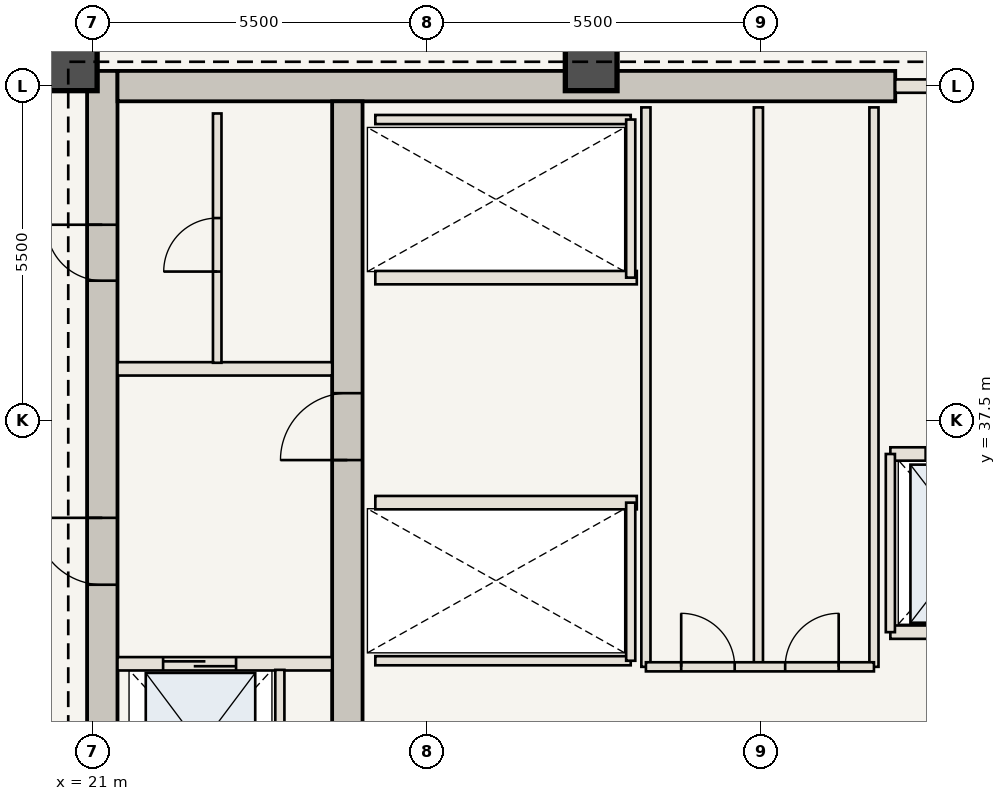
"""IFC4 building model, lengths in metres.
Left out: names, types, materials, properties, quantities, classifications, styles, units other than length and angle.
Written with IfcOpenShell. Run it as: python <this file> out.ifc"""

import sys

from ifc_helpers import new_model, si_unit, direction, frame, frame_2d, origin, origin_2d, place, context, subcontext, project, spatial, rectangle, extrude, element, fill, save


model = new_model("IFC4")
c1 = context("Model", 3, precision=1e-05, world=origin(), true_north=direction((0.0, 1.0)))
c2 = subcontext(c1, "Body", "Model", "MODEL_VIEW")
j1 = project(units=[si_unit("LENGTHUNIT", "METRE"), si_unit("PLANEANGLEUNIT", "RADIAN")], contexts=[c1])
p1 = place(None, origin())
s1 = spatial("IfcSite", under=j1, at=p1, CompositionType="ELEMENT")
p2 = place(p1, origin())
s2 = spatial("IfcBuilding", under=s1, at=p2, CompositionType="ELEMENT")
p3 = place(p2, frame((0.0, 0.0, 248.5)))
s3 = spatial("IfcBuildingStorey", under=s2, at=p3, CompositionType="ELEMENT", Elevation=248.5)
p4 = place(p3, frame((21.16, 30.6, 0.0), z_axis=(0.0, 0.0, 1.0), x_axis=(0.0, 1.0, 0.0)))
e1 = element("IfcWall", 1, at=p4, inside=s3, PredefinedType="SHEAR", context=c2, shape_type="SweptSolid", body=[
    extrude(rectangle(XDim=12.65, YDim=0.5, at=frame_2d((6.325, 0.0))), origin(), (0.0, 0.0, 1.0), 3.85),
])
p5 = place(p4, frame((4.2, 0.0, 0.0)))
e2 = element("IfcOpeningElement", 2, at=p5, cuts=e1, PredefinedType="OPENING", context=c2, shape_type="SweptSolid", body=[
    extrude(rectangle(XDim=1.1, YDim=2.15, at=frame_2d((0.55, 1.075))), frame((0.0, 0.26, 0.0), z_axis=(0.0, -1.0, 0.0), x_axis=(1.0, 0.0, 0.0)), (0.0, 0.0, 1.0), 0.52),
])
p6 = place(p4, frame((9.2, 0.0, 0.0)))
e3 = element("IfcOpeningElement", 3, at=p6, cuts=e1, PredefinedType="OPENING", context=c2, shape_type="SweptSolid", body=[
    extrude(rectangle(XDim=0.92, YDim=2.1, at=frame_2d((0.46, 1.05))), frame((0.0, 0.26, 0.0), z_axis=(0.0, -1.0, 0.0), x_axis=(1.0, 0.0, 0.0)), (0.0, 0.0, 1.0), 0.52),
])
p7 = place(p3, frame((21.41, 43.0, 0.0), z_axis=(0.0, 0.0, 1.0), x_axis=(1.0, 0.0, 0.0)))
e4 = element("IfcWall", 4, at=p7, inside=s3, PredefinedType="SHEAR", context=c2, shape_type="SweptSolid", body=[
    extrude(rectangle(XDim=12.79, YDim=0.5, at=frame_2d((6.395, 0.0))), origin(), (0.0, 0.0, 1.0), 3.85),
])
p8 = place(p3, frame((25.19, 30.6, 0.0), z_axis=(0.0, 0.0, 1.0), x_axis=(0.0, 1.0, 0.0)))
e5 = element("IfcWall", 5, at=p8, inside=s3, PredefinedType="SHEAR", context=c2, shape_type="SweptSolid", body=[
    extrude(rectangle(XDim=12.15, YDim=0.5, at=frame_2d((6.075, 0.0))), origin(), (0.0, 0.0, 1.0), 3.85),
])
p9 = place(p8, frame((6.25, 0.0, 0.0)))
e6 = element("IfcOpeningElement", 6, at=p9, cuts=e5, PredefinedType="OPENING", context=c2, shape_type="SweptSolid", body=[
    extrude(rectangle(XDim=1.1, YDim=2.15, at=frame_2d((0.55, 1.075))), frame((0.0, 0.26, 0.0), z_axis=(0.0, -1.0, 0.0), x_axis=(1.0, 0.0, 0.0)), (0.0, 0.0, 1.0), 0.52),
])
for number, where, z_axis, x_axis in (
    (7, (29.2, 43.35, 0.0), (0.0, 0.0, 1.0), (1.0, 0.0, 0.0)),
    (8, (20.65, 43.35, 0.0), (0.0, 0.0, 1.0), (1.0, 0.0, 0.0)),
):
    element("IfcColumn", number, at=place(p3, frame(where, z_axis=z_axis, x_axis=x_axis)), inside=s3, PredefinedType="COLUMN", context=c2, shape_type="SweptSolid", body=[
        extrude(rectangle(XDim=0.85, YDim=0.85, at=origin_2d()), origin(), (0.0, 0.0, 1.0), 3.85),
    ])
p10 = place(p3, frame((21.41, 33.5, 0.0), z_axis=(0.0, 0.0, 1.0), x_axis=(1.0, 0.0, 0.0)))
e9 = element("IfcWall", 9, at=p10, inside=s3, PredefinedType="STANDARD", context=c2, shape_type="SweptSolid", body=[
    extrude(rectangle(XDim=3.53, YDim=0.22, at=frame_2d((1.765, 0.0))), origin(), (0.0, 0.0, 1.0), 3.43),
])
p11 = place(p10, frame((0.75, 0.0, 0.0)))
e10 = element("IfcOpeningElement", 10, at=p11, cuts=e9, PredefinedType="OPENING", context=c2, shape_type="SweptSolid", body=[
    extrude(rectangle(XDim=1.2, YDim=2.2, at=frame_2d((0.6, 1.1))), frame((0.0, 0.12, 0.0), z_axis=(0.0, -1.0, 0.0), x_axis=(1.0, 0.0, 0.0)), (0.0, 0.0, 1.0), 0.24),
])
p12 = place(p3, frame((24.08, 30.75, 0.0), z_axis=(0.0, 0.0, 1.0), x_axis=(0.0, 1.0, 0.0)))
e11 = element("IfcWall", 11, at=p12, inside=s3, PredefinedType="STANDARD", context=c2, shape_type="SweptSolid", body=[
    extrude(rectangle(XDim=2.65, YDim=0.15, at=frame_2d((1.325, 0.0))), origin(), (0.0, 0.0, 1.0), 3.43),
])
p13 = place(p3, frame((21.41, 38.35, 0.0), z_axis=(0.0, 0.0, 1.0), x_axis=(1.0, 0.0, 0.0)))
e12 = element("IfcWall", 12, at=p13, inside=s3, PredefinedType="STANDARD", context=c2, shape_type="SweptSolid", body=[
    extrude(rectangle(XDim=3.53, YDim=0.22, at=frame_2d((1.765, 0.0))), origin(), (0.0, 0.0, 1.0), 3.43),
])
p14 = place(p3, frame((23.05, 38.45, 0.0), z_axis=(0.0, 0.0, 1.0), x_axis=(0.0, 1.0, 0.0)))
e13 = element("IfcWall", 13, at=p14, inside=s3, PredefinedType="STANDARD", context=c2, shape_type="SweptSolid", body=[
    extrude(rectangle(XDim=4.1, YDim=0.14, at=frame_2d((2.05, 0.0))), origin(), (0.0, 0.0, 1.0), 3.43),
])
p15 = place(p14, frame((1.5, 0.0, 0.0)))
e14 = element("IfcOpeningElement", 14, at=p15, cuts=e13, PredefinedType="OPENING", context=c2, shape_type="SweptSolid", body=[
    extrude(rectangle(XDim=0.88, YDim=2.1, at=frame_2d((0.44, 1.05))), frame((0.0, 0.08, 0.0), z_axis=(0.0, -1.0, 0.0), x_axis=(1.0, 0.0, 0.0)), (0.0, 0.0, 1.0), 0.16),
])
p16 = place(p3, frame((25.65, 36.15, 0.0), z_axis=(0.0, 0.0, 1.0), x_axis=(1.0, 0.0, 0.0)))
e15 = element("IfcWall", 15, at=p16, inside=s3, PredefinedType="STANDARD", context=c2, shape_type="SweptSolid", body=[
    extrude(rectangle(XDim=4.3, YDim=0.22, at=frame_2d((2.15, 0.0))), origin(), (0.0, 0.0, 1.0), 3.43),
])
p17 = place(p3, frame((25.65, 33.55, 0.0), z_axis=(0.0, 0.0, 1.0), x_axis=(1.0, 0.0, 0.0)))
e16 = element("IfcWall", 16, at=p17, inside=s3, PredefinedType="STANDARD", context=c2, shape_type="SweptSolid", body=[
    extrude(rectangle(XDim=4.2, YDim=0.15, at=frame_2d((2.1, 0.0))), origin(), (0.0, 0.0, 1.0), 3.43),
])
p18 = place(p3, frame((29.85, 33.55, 0.0), z_axis=(0.0, 0.0, 1.0), x_axis=(0.0, 1.0, 0.0)))
e17 = element("IfcWall", 17, at=p18, inside=s3, PredefinedType="STANDARD", context=c2, shape_type="SweptSolid", body=[
    extrude(rectangle(XDim=2.6, YDim=0.15, at=frame_2d((1.3, 0.0))), origin(), (0.0, 0.0, 1.0), 3.43),
])
p19 = place(p3, frame((25.65, 39.85, 0.0), z_axis=(0.0, 0.0, 1.0), x_axis=(1.0, 0.0, 0.0)))
e18 = element("IfcWall", 18, at=p19, inside=s3, PredefinedType="STANDARD", context=c2, shape_type="SweptSolid", body=[
    extrude(rectangle(XDim=4.3, YDim=0.22, at=frame_2d((2.15, 0.0))), origin(), (0.0, 0.0, 1.0), 3.43),
])
p20 = place(p3, frame((25.65, 42.45, 0.0), z_axis=(0.0, 0.0, 1.0), x_axis=(1.0, 0.0, 0.0)))
e19 = element("IfcWall", 19, at=p20, inside=s3, PredefinedType="STANDARD", context=c2, shape_type="SweptSolid", body=[
    extrude(rectangle(XDim=4.2, YDim=0.15, at=frame_2d((2.1, 0.0))), origin(), (0.0, 0.0, 1.0), 3.43),
])
p21 = place(p3, frame((29.85, 39.85, 0.0), z_axis=(0.0, 0.0, 1.0), x_axis=(0.0, 1.0, 0.0)))
e20 = element("IfcWall", 20, at=p21, inside=s3, PredefinedType="STANDARD", context=c2, shape_type="SweptSolid", body=[
    extrude(rectangle(XDim=2.6, YDim=0.15, at=frame_2d((1.3, 0.0))), origin(), (0.0, 0.0, 1.0), 3.43),
])
for number, where, z_axis, x_axis in (
    (21, (30.1, 33.45, 0.0), (0.0, 0.0, 1.0), (0.0, 1.0, 0.0)),
    (22, (31.95, 33.45, 0.0), (0.0, 0.0, 1.0), (0.0, 1.0, 0.0)),
    (23, (33.85, 33.45, 0.0), (0.0, 0.0, 1.0), (0.0, 1.0, 0.0)),
):
    element("IfcWall", number, at=place(p3, frame(where, z_axis=z_axis, x_axis=x_axis)), inside=s3, PredefinedType="STANDARD", context=c2, shape_type="SweptSolid", body=[
        extrude(rectangle(XDim=9.2, YDim=0.15, at=frame_2d((4.6, 0.0))), origin(), (0.0, 0.0, 1.0), 3.43),
    ])
p22 = place(p3, frame((30.1, 33.45, 0.0), z_axis=(0.0, 0.0, 1.0), x_axis=(1.0, 0.0, 0.0)))
e24 = element("IfcWall", 24, at=p22, inside=s3, PredefinedType="STANDARD", context=c2, shape_type="SweptSolid", body=[
    extrude(rectangle(XDim=3.75, YDim=0.15, at=frame_2d((1.875, 0.0))), origin(), (0.0, 0.0, 1.0), 3.43),
])
p23 = place(p22, frame((0.58, 0.0, 0.0)))
e25 = element("IfcOpeningElement", 25, at=p23, cuts=e24, PredefinedType="OPENING", context=c2, shape_type="SweptSolid", body=[
    extrude(rectangle(XDim=0.88, YDim=2.1, at=frame_2d((0.44, 1.05))), frame((0.0, 0.085, 0.0), z_axis=(0.0, -1.0, 0.0), x_axis=(1.0, 0.0, 0.0)), (0.0, 0.0, 1.0), 0.17),
])
p24 = place(p22, frame((2.29, 0.0, 0.0)))
e26 = element("IfcOpeningElement", 26, at=p24, cuts=e24, PredefinedType="OPENING", context=c2, shape_type="SweptSolid", body=[
    extrude(rectangle(XDim=0.88, YDim=2.1, at=frame_2d((0.44, 1.05))), frame((0.0, 0.085, 0.0), z_axis=(0.0, -1.0, 0.0), x_axis=(1.0, 0.0, 0.0)), (0.0, 0.0, 1.0), 0.17),
])
p25 = place(p3, frame((34.2, 43.0, 0.0), z_axis=(0.0, 0.0, 1.0), x_axis=(1.0, 0.0, 0.0)))
e27 = element("IfcWall", 27, at=p25, inside=s3, PredefinedType="STANDARD", context=c2, shape_type="SweptSolid", body=[
    extrude(rectangle(XDim=3.55, YDim=0.22, at=frame_2d((1.775, 0.0))), origin(), (0.0, 0.0, 1.0), 3.43),
])
p26 = place(p25, frame((1.4, 0.0, 0.0)))
e28 = element("IfcOpeningElement", 28, at=p26, cuts=e27, PredefinedType="OPENING", context=c2, shape_type="SweptSolid", body=[
    extrude(rectangle(XDim=1.1, YDim=2.15, at=frame_2d((0.55, 1.075))), frame((0.0, 0.12, 0.0), z_axis=(0.0, -1.0, 0.0), x_axis=(1.0, 0.0, 0.0)), (0.0, 0.0, 1.0), 0.24),
])
p27 = place(p3, frame((34.12, 36.95, 0.0), z_axis=(0.0, 0.0, 1.0), x_axis=(1.0, 0.0, 0.0)))
e29 = element("IfcWall", 29, at=p27, inside=s3, PredefinedType="STANDARD", context=c2, shape_type="SweptSolid", body=[
    extrude(rectangle(XDim=2.68, YDim=0.22, at=frame_2d((1.34, 0.0))), origin(), (0.0, 0.0, 1.0), 3.43),
])
p28 = place(p27, frame((0.58, 0.0, 0.0)))
e30 = element("IfcOpeningElement", 30, at=p28, cuts=e29, PredefinedType="OPENING", context=c2, shape_type="SweptSolid", body=[
    extrude(rectangle(XDim=1.2, YDim=2.2, at=frame_2d((0.6, 1.1))), frame((0.0, 0.12, 0.0), z_axis=(0.0, -1.0, 0.0), x_axis=(1.0, 0.0, 0.0)), (0.0, 0.0, 1.0), 0.24),
])
p29 = place(p3, frame((34.12, 34.02, 0.0), z_axis=(0.0, 0.0, 1.0), x_axis=(1.0, 0.0, 0.0)))
e31 = element("IfcWall", 31, at=p29, inside=s3, PredefinedType="STANDARD", context=c2, shape_type="SweptSolid", body=[
    extrude(rectangle(XDim=2.68, YDim=0.22, at=frame_2d((1.34, 0.0))), origin(), (0.0, 0.0, 1.0), 3.43),
])
p30 = place(p3, frame((34.12, 34.02, 0.0), z_axis=(0.0, 0.0, 1.0), x_axis=(0.0, 1.0, 0.0)))
e32 = element("IfcWall", 32, at=p30, inside=s3, PredefinedType="STANDARD", context=c2, shape_type="SweptSolid", body=[
    extrude(rectangle(XDim=2.93, YDim=0.15, at=frame_2d((1.465, 0.0))), origin(), (0.0, 0.0, 1.0), 3.43),
])
p31 = place(p5, origin())
e33 = element("IfcDoor", 33, at=p31, inside=s3, OperationType="SINGLE_SWING_RIGHT", PredefinedType="DOOR", context=c2, shape_type="SweptSolid", body=[
    extrude(rectangle(XDim=1.1, YDim=2.15, at=frame_2d((0.55, 1.075))), frame((0.0, 0.025, 0.0), z_axis=(0.0, -1.0, 0.0), x_axis=(1.0, 0.0, 0.0)), (0.0, 0.0, 1.0), 0.05),
])
fill(e2, e33)
p32 = place(p9, origin())
e34 = element("IfcDoor", 34, at=p32, inside=s3, OperationType="SINGLE_SWING_LEFT", PredefinedType="DOOR", context=c2, shape_type="SweptSolid", body=[
    extrude(rectangle(XDim=1.1, YDim=2.15, at=frame_2d((0.55, 1.075))), frame((0.0, 0.025, 0.0), z_axis=(0.0, -1.0, 0.0), x_axis=(1.0, 0.0, 0.0)), (0.0, 0.0, 1.0), 0.05),
])
fill(e6, e34)
p33 = place(p6, origin())
e35 = element("IfcDoor", 35, at=p33, inside=s3, OperationType="SINGLE_SWING_RIGHT", PredefinedType="DOOR", context=c2, shape_type="SweptSolid", body=[
    extrude(rectangle(XDim=0.92, YDim=2.1, at=frame_2d((0.46, 1.05))), frame((0.0, 0.025, 0.0), z_axis=(0.0, -1.0, 0.0), x_axis=(1.0, 0.0, 0.0)), (0.0, 0.0, 1.0), 0.05),
])
fill(e3, e35)
p34 = place(p11, origin())
e36 = element("IfcDoor", 36, at=p34, inside=s3, OperationType="DOUBLE_DOOR_SLIDING", PredefinedType="DOOR", context=c2, shape_type="SweptSolid", body=[
    extrude(rectangle(XDim=1.2, YDim=2.2, at=frame_2d((0.6, 1.1))), frame((0.0, 0.025, 0.0), z_axis=(0.0, -1.0, 0.0), x_axis=(1.0, 0.0, 0.0)), (0.0, 0.0, 1.0), 0.05),
])
fill(e10, e36)
p35 = place(p15, origin())
e37 = element("IfcDoor", 37, at=p35, inside=s3, OperationType="SINGLE_SWING_LEFT", PredefinedType="DOOR", context=c2, shape_type="SweptSolid", body=[
    extrude(rectangle(XDim=0.88, YDim=2.1, at=frame_2d((0.44, 1.05))), frame((0.0, 0.025, 0.0), z_axis=(0.0, -1.0, 0.0), x_axis=(1.0, 0.0, 0.0)), (0.0, 0.0, 1.0), 0.05),
])
fill(e14, e37)
p36 = place(p23, origin())
e38 = element("IfcDoor", 38, at=p36, inside=s3, OperationType="SINGLE_SWING_LEFT", PredefinedType="DOOR", context=c2, shape_type="SweptSolid", body=[
    extrude(rectangle(XDim=0.88, YDim=2.1, at=frame_2d((0.44, 1.05))), frame((0.0, 0.025, 0.0), z_axis=(0.0, -1.0, 0.0), x_axis=(1.0, 0.0, 0.0)), (0.0, 0.0, 1.0), 0.05),
])
fill(e25, e38)
p37 = place(p24, origin())
e39 = element("IfcDoor", 39, at=p37, inside=s3, OperationType="SINGLE_SWING_RIGHT", PredefinedType="DOOR", context=c2, shape_type="SweptSolid", body=[
    extrude(rectangle(XDim=0.88, YDim=2.1, at=frame_2d((0.44, 1.05))), frame((0.0, 0.025, 0.0), z_axis=(0.0, -1.0, 0.0), x_axis=(1.0, 0.0, 0.0)), (0.0, 0.0, 1.0), 0.05),
])
fill(e26, e39)
p38 = place(p28, origin())
e40 = element("IfcDoor", 40, at=p38, inside=s3, OperationType="DOUBLE_DOOR_SLIDING", PredefinedType="DOOR", context=c2, shape_type="SweptSolid", body=[
    extrude(rectangle(XDim=1.2, YDim=2.2, at=frame_2d((0.6, 1.1))), frame((0.0, 0.025, 0.0), z_axis=(0.0, -1.0, 0.0), x_axis=(1.0, 0.0, 0.0)), (0.0, 0.0, 1.0), 0.05),
])
fill(e30, e40)
save(model, sys.argv[1])
